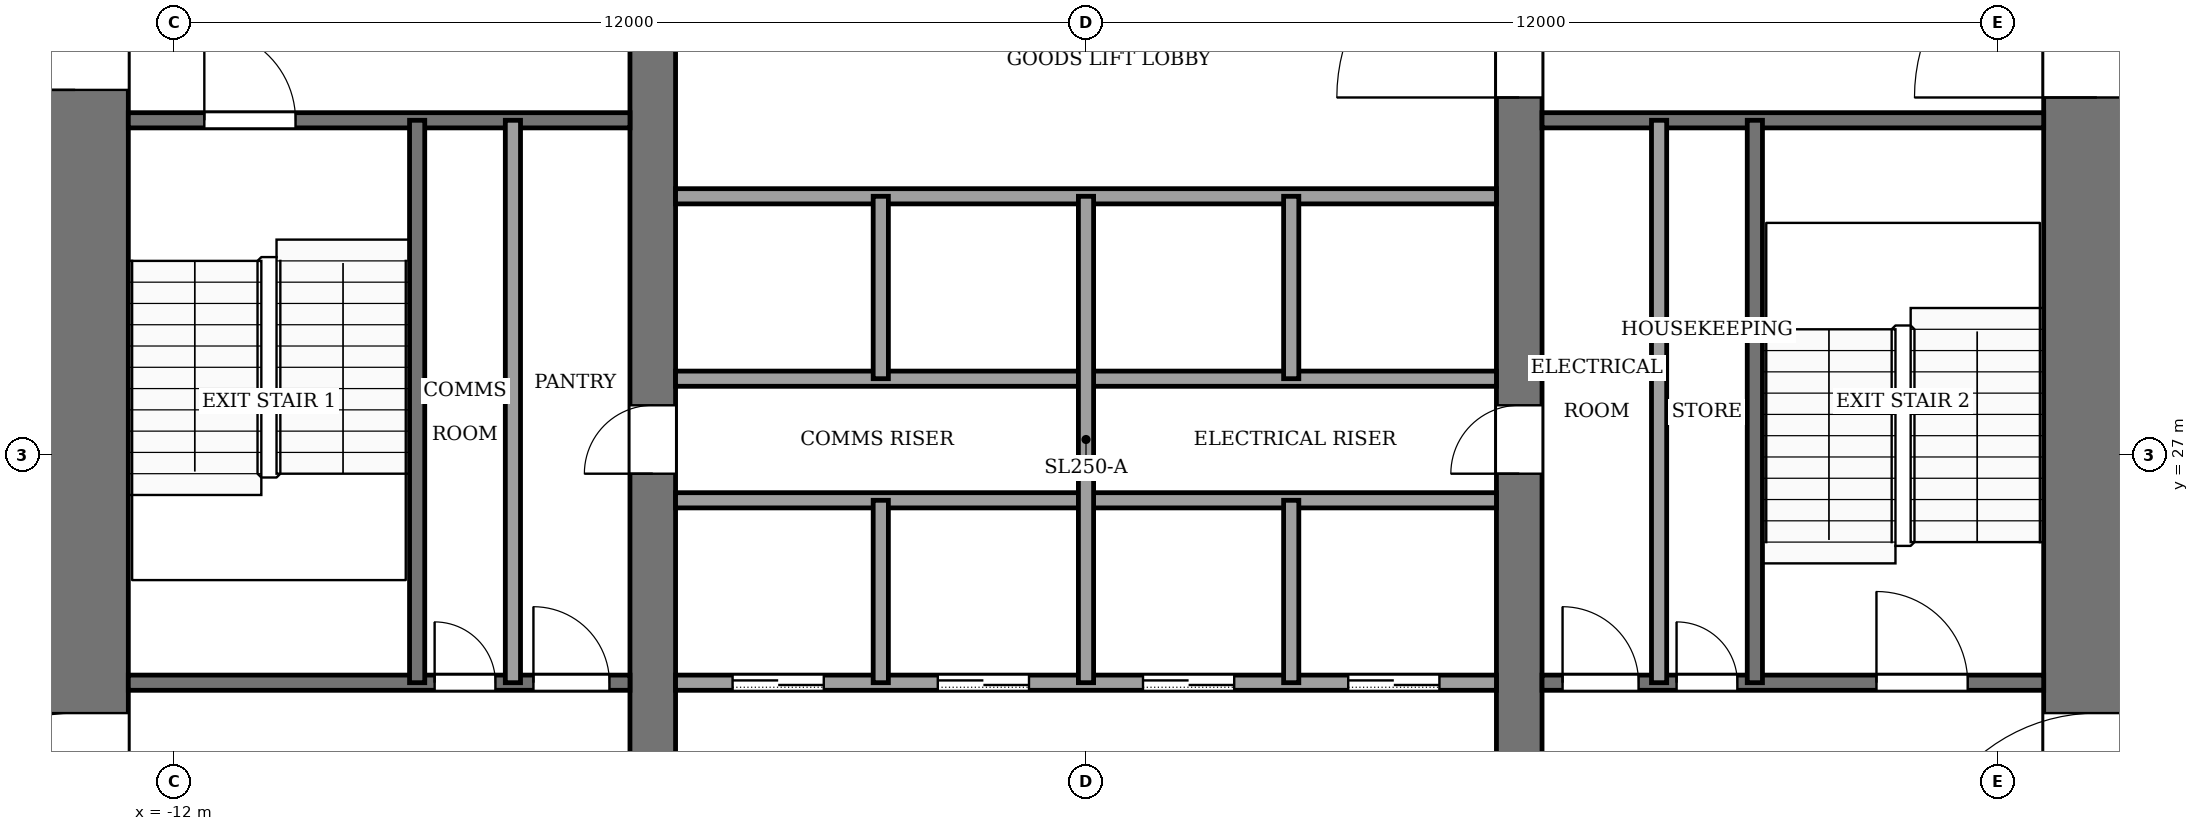
"""IFC4 building model, lengths in metres.
Left out: names, types, materials, properties, quantities, classifications, styles, units other than length and angle.
Written with IfcOpenShell. Run it as: python <this file> out.ifc"""

import sys

from ifc_helpers import new_model, si_unit, direction, frame, frame_2d, origin, place, context, subcontext, project, spatial, rectangle, extrude, element, fill, save


model = new_model("IFC4")
c1 = context("Model", 3, precision=1e-05, world=origin(), true_north=direction((0.0, 1.0)))
c2 = subcontext(c1, "Body", "Model", "MODEL_VIEW")
j1 = project(units=[si_unit("LENGTHUNIT", "METRE"), si_unit("PLANEANGLEUNIT", "RADIAN")], contexts=[c1])
p1 = place(None, origin())
s1 = spatial("IfcSite", under=j1, at=p1, CompositionType="ELEMENT")
p2 = place(p1, origin())
s2 = spatial("IfcBuilding", under=s1, at=p2, CompositionType="ELEMENT")
p3 = place(p2, frame((0.0, 0.0, 50.0)))
s3 = spatial("IfcBuildingStorey", under=s2, at=p3, CompositionType="ELEMENT", Elevation=50.0)
p4 = place(p3, frame((-13.3, 18.4, -0.13), z_axis=(0.0, 0.0, 1.0), x_axis=(0.0, 1.0, 0.0)))
e1 = element("IfcWall", 1, at=p4, inside=s3, PredefinedType="SHEAR", context=c2, shape_type="SweptSolid", body=[
    extrude(rectangle(XDim=19.2, YDim=1.4, at=frame_2d((9.6, 0.0))), origin(), (0.0, 0.0, 1.0), 4.0),
])
p5 = place(p4, frame((2.8, 0.0, 0.13)))
e2 = element("IfcOpeningElement", 2, at=p5, cuts=e1, PredefinedType="OPENING", context=c2, shape_type="SweptSolid", body=[
    extrude(rectangle(XDim=2.4, YDim=2.4, at=frame_2d((1.2, 1.2))), frame((0.0, 0.71, 0.0), z_axis=(0.0, -1.0, 0.0), x_axis=(1.0, 0.0, 0.0)), (0.0, 0.0, 1.0), 1.42),
])
p6 = place(p4, frame((13.4, 0.0, 0.13)))
e3 = element("IfcOpeningElement", 3, at=p6, cuts=e1, PredefinedType="OPENING", context=c2, shape_type="SweptSolid", body=[
    extrude(rectangle(XDim=1.4, YDim=2.2, at=frame_2d((0.7, 1.1))), frame((0.0, 0.71, 0.0), z_axis=(0.0, -1.0, 0.0), x_axis=(1.0, 0.0, 0.0)), (0.0, 0.0, 1.0), 1.42),
])
p7 = place(p3, frame((13.3, 18.4, -0.13), z_axis=(0.0, 0.0, 1.0), x_axis=(0.0, 1.0, 0.0)))
e4 = element("IfcWall", 4, at=p7, inside=s3, PredefinedType="SHEAR", context=c2, shape_type="SweptSolid", body=[
    extrude(rectangle(XDim=19.2, YDim=1.4, at=frame_2d((9.6, 0.0))), origin(), (0.0, 0.0, 1.0), 4.0),
])
p8 = place(p7, frame((2.8, 0.0, 0.13)))
e5 = element("IfcOpeningElement", 5, at=p8, cuts=e4, PredefinedType="OPENING", context=c2, shape_type="SweptSolid", body=[
    extrude(rectangle(XDim=2.4, YDim=2.4, at=frame_2d((1.2, 1.2))), frame((0.0, 0.71, 0.0), z_axis=(0.0, -1.0, 0.0), x_axis=(1.0, 0.0, 0.0)), (0.0, 0.0, 1.0), 1.42),
])
p9 = place(p7, frame((13.3, 0.0, 0.13)))
e6 = element("IfcOpeningElement", 6, at=p9, cuts=e4, PredefinedType="OPENING", context=c2, shape_type="SweptSolid", body=[
    extrude(rectangle(XDim=2.4, YDim=2.4, at=frame_2d((1.2, 1.2))), frame((0.0, 0.71, 0.0), z_axis=(0.0, -1.0, 0.0), x_axis=(1.0, 0.0, 0.0)), (0.0, 0.0, 1.0), 1.42),
])
p10 = place(p3, frame((-5.7, 18.4, -0.13), z_axis=(0.0, 0.0, 1.0), x_axis=(0.0, 1.0, 0.0)))
e7 = element("IfcWall", 7, at=p10, inside=s3, PredefinedType="SHEAR", context=c2, shape_type="SweptSolid", body=[
    extrude(rectangle(XDim=19.2, YDim=0.6, at=frame_2d((9.6, 0.0))), origin(), (0.0, 0.0, 1.0), 4.0),
])
p11 = place(p10, frame((8.35, 0.0, 0.13)))
e8 = element("IfcOpeningElement", 8, at=p11, cuts=e7, PredefinedType="OPENING", context=c2, shape_type="SweptSolid", body=[
    extrude(rectangle(XDim=0.9, YDim=2.1, at=frame_2d((0.45, 1.05))), frame((0.0, 0.31, 0.0), z_axis=(0.0, -1.0, 0.0), x_axis=(1.0, 0.0, 0.0)), (0.0, 0.0, 1.0), 0.62),
])
p12 = place(p3, frame((5.7, 18.4, -0.13), z_axis=(0.0, 0.0, 1.0), x_axis=(0.0, 1.0, 0.0)))
e9 = element("IfcWall", 9, at=p12, inside=s3, PredefinedType="SHEAR", context=c2, shape_type="SweptSolid", body=[
    extrude(rectangle(XDim=19.2, YDim=0.6, at=frame_2d((9.6, 0.0))), origin(), (0.0, 0.0, 1.0), 4.0),
])
p13 = place(p12, frame((8.35, 0.0, 0.13)))
e10 = element("IfcOpeningElement", 10, at=p13, cuts=e9, PredefinedType="OPENING", context=c2, shape_type="SweptSolid", body=[
    extrude(rectangle(XDim=0.9, YDim=2.1, at=frame_2d((0.45, 1.05))), frame((0.0, 0.31, 0.0), z_axis=(0.0, -1.0, 0.0), x_axis=(1.0, 0.0, 0.0)), (0.0, 0.0, 1.0), 0.62),
])
p14 = place(p12, frame((13.3, 0.0, 0.13)))
e11 = element("IfcOpeningElement", 11, at=p14, cuts=e9, PredefinedType="OPENING", context=c2, shape_type="SweptSolid", body=[
    extrude(rectangle(XDim=2.4, YDim=2.4, at=frame_2d((1.2, 1.2))), frame((0.0, 0.31, 0.0), z_axis=(0.0, -1.0, 0.0), x_axis=(1.0, 0.0, 0.0)), (0.0, 0.0, 1.0), 0.62),
])
p15 = place(p3, frame((-12.6, 24.0, 0.0), z_axis=(0.0, 0.0, 1.0), x_axis=(1.0, 0.0, 0.0)))
e12 = element("IfcWall", 12, at=p15, inside=s3, PredefinedType="PARTITIONING", context=c2, shape_type="SweptSolid", body=[
    extrude(rectangle(XDim=6.6, YDim=0.2, at=frame_2d((3.3, 0.0))), origin(), (0.0, 0.0, 1.0), 3.87),
])
p16 = place(p15, frame((4.03, 0.0, 0.0)))
e13 = element("IfcOpeningElement", 13, at=p16, cuts=e12, PredefinedType="OPENING", context=c2, shape_type="SweptSolid", body=[
    extrude(rectangle(XDim=0.8, YDim=2.1, at=frame_2d((0.4, 1.05))), frame((0.0, 0.11, 0.0), z_axis=(0.0, -1.0, 0.0), x_axis=(1.0, 0.0, 0.0)), (0.0, 0.0, 1.0), 0.22),
])
p17 = place(p15, frame((5.33, 0.0, 0.0)))
e14 = element("IfcOpeningElement", 14, at=p17, cuts=e12, PredefinedType="OPENING", context=c2, shape_type="SweptSolid", body=[
    extrude(rectangle(XDim=1.0, YDim=2.1, at=frame_2d((0.5, 1.05))), frame((0.0, 0.11, 0.0), z_axis=(0.0, -1.0, 0.0), x_axis=(1.0, 0.0, 0.0)), (0.0, 0.0, 1.0), 0.22),
])
p18 = place(p3, frame((-5.4, 24.0, 0.0), z_axis=(0.0, 0.0, 1.0), x_axis=(1.0, 0.0, 0.0)))
e15 = element("IfcWall", 15, at=p18, inside=s3, PredefinedType="PARTITIONING", context=c2, shape_type="SweptSolid", body=[
    extrude(rectangle(XDim=10.8, YDim=0.2, at=frame_2d((5.4, 0.0))), origin(), (0.0, 0.0, 1.0), 3.87),
])
p19 = place(p18, frame((0.75, 0.0, 0.0)))
e16 = element("IfcOpeningElement", 16, at=p19, cuts=e15, PredefinedType="OPENING", context=c2, shape_type="SweptSolid", body=[
    extrude(rectangle(XDim=1.2, YDim=2.2, at=frame_2d((0.6, 1.1))), frame((0.0, 0.11, 0.0), z_axis=(0.0, -1.0, 0.0), x_axis=(1.0, 0.0, 0.0)), (0.0, 0.0, 1.0), 0.22),
])
p20 = place(p18, frame((3.45, 0.0, 0.0)))
e17 = element("IfcOpeningElement", 17, at=p20, cuts=e15, PredefinedType="OPENING", context=c2, shape_type="SweptSolid", body=[
    extrude(rectangle(XDim=1.2, YDim=2.2, at=frame_2d((0.6, 1.1))), frame((0.0, 0.11, 0.0), z_axis=(0.0, -1.0, 0.0), x_axis=(1.0, 0.0, 0.0)), (0.0, 0.0, 1.0), 0.22),
])
p21 = place(p18, frame((6.15, 0.0, 0.0)))
e18 = element("IfcOpeningElement", 18, at=p21, cuts=e15, PredefinedType="OPENING", context=c2, shape_type="SweptSolid", body=[
    extrude(rectangle(XDim=1.2, YDim=2.2, at=frame_2d((0.6, 1.1))), frame((0.0, 0.11, 0.0), z_axis=(0.0, -1.0, 0.0), x_axis=(1.0, 0.0, 0.0)), (0.0, 0.0, 1.0), 0.22),
])
p22 = place(p18, frame((8.85, 0.0, 0.0)))
e19 = element("IfcOpeningElement", 19, at=p22, cuts=e15, PredefinedType="OPENING", context=c2, shape_type="SweptSolid", body=[
    extrude(rectangle(XDim=1.2, YDim=2.2, at=frame_2d((0.6, 1.1))), frame((0.0, 0.11, 0.0), z_axis=(0.0, -1.0, 0.0), x_axis=(1.0, 0.0, 0.0)), (0.0, 0.0, 1.0), 0.22),
])
p23 = place(p3, frame((6.0, 24.0, 0.0), z_axis=(0.0, 0.0, 1.0), x_axis=(1.0, 0.0, 0.0)))
e20 = element("IfcWall", 20, at=p23, inside=s3, PredefinedType="PARTITIONING", context=c2, shape_type="SweptSolid", body=[
    extrude(rectangle(XDim=6.6, YDim=0.2, at=frame_2d((3.3, 0.0))), origin(), (0.0, 0.0, 1.0), 3.87),
])
p24 = place(p23, frame((0.27, 0.0, 0.0)))
e21 = element("IfcOpeningElement", 21, at=p24, cuts=e20, PredefinedType="OPENING", context=c2, shape_type="SweptSolid", body=[
    extrude(rectangle(XDim=1.0, YDim=2.1, at=frame_2d((0.5, 1.05))), frame((0.0, 0.11, 0.0), z_axis=(0.0, -1.0, 0.0), x_axis=(1.0, 0.0, 0.0)), (0.0, 0.0, 1.0), 0.22),
])
p25 = place(p23, frame((1.77, 0.0, 0.0)))
e22 = element("IfcOpeningElement", 22, at=p25, cuts=e20, PredefinedType="OPENING", context=c2, shape_type="SweptSolid", body=[
    extrude(rectangle(XDim=0.8, YDim=2.1, at=frame_2d((0.4, 1.05))), frame((0.0, 0.11, 0.0), z_axis=(0.0, -1.0, 0.0), x_axis=(1.0, 0.0, 0.0)), (0.0, 0.0, 1.0), 0.22),
])
p26 = place(p23, frame((4.4, 0.0, 0.0)))
e23 = element("IfcOpeningElement", 23, at=p26, cuts=e20, PredefinedType="OPENING", context=c2, shape_type="SweptSolid", body=[
    extrude(rectangle(XDim=1.2, YDim=2.2, at=frame_2d((0.6, 1.1))), frame((0.0, 0.11, 0.0), z_axis=(0.0, -1.0, 0.0), x_axis=(1.0, 0.0, 0.0)), (0.0, 0.0, 1.0), 0.22),
])
for number, where, z_axis, x_axis in (
    (24, (-5.4, 26.4, 0.0), (0.0, 0.0, 1.0), (1.0, 0.0, 0.0)),
    (25, (-5.4, 28.0, 0.0), (0.0, 0.0, 1.0), (1.0, 0.0, 0.0)),
    (26, (-5.4, 30.4, 0.0), (0.0, 0.0, 1.0), (1.0, 0.0, 0.0)),
):
    element("IfcWall", number, at=place(p3, frame(where, z_axis=z_axis, x_axis=x_axis)), inside=s3, PredefinedType="PARTITIONING", context=c2, shape_type="SweptSolid", body=[
        extrude(rectangle(XDim=10.8, YDim=0.2, at=frame_2d((5.4, 0.0))), origin(), (0.0, 0.0, 1.0), 3.87),
    ])
p27 = place(p3, frame((-12.6, 31.4, 0.0), z_axis=(0.0, 0.0, 1.0), x_axis=(1.0, 0.0, 0.0)))
e27 = element("IfcWall", 27, at=p27, inside=s3, PredefinedType="PARTITIONING", context=c2, shape_type="SweptSolid", body=[
    extrude(rectangle(XDim=6.6, YDim=0.2, at=frame_2d((3.3, 0.0))), origin(), (0.0, 0.0, 1.0), 3.87),
])
p28 = place(p27, frame((1.0, 0.0, 0.0)))
e28 = element("IfcOpeningElement", 28, at=p28, cuts=e27, PredefinedType="OPENING", context=c2, shape_type="SweptSolid", body=[
    extrude(rectangle(XDim=1.2, YDim=2.2, at=frame_2d((0.6, 1.1))), frame((0.0, 0.11, 0.0), z_axis=(0.0, -1.0, 0.0), x_axis=(1.0, 0.0, 0.0)), (0.0, 0.0, 1.0), 0.22),
])
p29 = place(p3, frame((6.0, 31.4, 0.0), z_axis=(0.0, 0.0, 1.0), x_axis=(1.0, 0.0, 0.0)))
e29 = element("IfcWall", 29, at=p29, inside=s3, PredefinedType="PARTITIONING", context=c2, shape_type="SweptSolid", body=[
    extrude(rectangle(XDim=6.6, YDim=0.2, at=frame_2d((3.3, 0.0))), origin(), (0.0, 0.0, 1.0), 3.87),
])
for number, where, z_axis, x_axis in (
    (30, (-8.8, 24.0, 0.0), (0.0, 0.0, 1.0), (0.0, 1.0, 0.0)),
    (31, (-7.54, 24.0, 0.0), (0.0, 0.0, 1.0), (0.0, 1.0, 0.0)),
):
    element("IfcWall", number, at=place(p3, frame(where, z_axis=z_axis, x_axis=x_axis)), inside=s3, PredefinedType="PARTITIONING", context=c2, shape_type="SweptSolid", body=[
        extrude(rectangle(XDim=7.4, YDim=0.2, at=frame_2d((3.7, 0.0))), origin(), (0.0, 0.0, 1.0), 3.87),
    ])
for number, where, z_axis, x_axis in (
    (32, (-2.7, 24.0, 0.0), (0.0, 0.0, 1.0), (0.0, 1.0, 0.0)),
    (33, (-2.7, 28.0, 0.0), (0.0, 0.0, 1.0), (0.0, 1.0, 0.0)),
):
    element("IfcWall", number, at=place(p3, frame(where, z_axis=z_axis, x_axis=x_axis)), inside=s3, PredefinedType="PARTITIONING", context=c2, shape_type="SweptSolid", body=[
        extrude(rectangle(XDim=2.4, YDim=0.2, at=frame_2d((1.2, 0.0))), origin(), (0.0, 0.0, 1.0), 3.87),
    ])
p30 = place(p3, frame((0.0, 24.0, 0.0), z_axis=(0.0, 0.0, 1.0), x_axis=(0.0, 1.0, 0.0)))
e34 = element("IfcWall", 34, at=p30, inside=s3, PredefinedType="PARTITIONING", context=c2, shape_type="SweptSolid", body=[
    extrude(rectangle(XDim=6.4, YDim=0.2, at=frame_2d((3.2, 0.0))), origin(), (0.0, 0.0, 1.0), 3.87),
])
for number, where, z_axis, x_axis in (
    (35, (2.7, 24.0, 0.0), (0.0, 0.0, 1.0), (0.0, 1.0, 0.0)),
    (36, (2.7, 28.0, 0.0), (0.0, 0.0, 1.0), (0.0, 1.0, 0.0)),
):
    element("IfcWall", number, at=place(p3, frame(where, z_axis=z_axis, x_axis=x_axis)), inside=s3, PredefinedType="PARTITIONING", context=c2, shape_type="SweptSolid", body=[
        extrude(rectangle(XDim=2.4, YDim=0.2, at=frame_2d((1.2, 0.0))), origin(), (0.0, 0.0, 1.0), 3.87),
    ])
for number, where, z_axis, x_axis in (
    (37, (7.54, 24.0, 0.0), (0.0, 0.0, 1.0), (0.0, 1.0, 0.0)),
    (38, (8.8, 24.0, 0.0), (0.0, 0.0, 1.0), (0.0, 1.0, 0.0)),
):
    element("IfcWall", number, at=place(p3, frame(where, z_axis=z_axis, x_axis=x_axis)), inside=s3, PredefinedType="PARTITIONING", context=c2, shape_type="SweptSolid", body=[
        extrude(rectangle(XDim=7.4, YDim=0.2, at=frame_2d((3.7, 0.0))), origin(), (0.0, 0.0, 1.0), 3.87),
    ])
p31 = place(p19, origin())
e39 = element("IfcDoor", 39, at=p31, inside=s3, OperationType="SLIDING_TO_LEFT", PredefinedType="DOOR", context=c2, shape_type="SweptSolid", body=[
    extrude(rectangle(XDim=1.2, YDim=2.2, at=frame_2d((0.6, 1.1))), frame((0.0, 0.025, 0.0), z_axis=(0.0, -1.0, 0.0), x_axis=(1.0, 0.0, 0.0)), (0.0, 0.0, 1.0), 0.05),
])
fill(e16, e39)
p32 = place(p20, origin())
e40 = element("IfcDoor", 40, at=p32, inside=s3, OperationType="SLIDING_TO_LEFT", PredefinedType="DOOR", context=c2, shape_type="SweptSolid", body=[
    extrude(rectangle(XDim=1.2, YDim=2.2, at=frame_2d((0.6, 1.1))), frame((0.0, 0.025, 0.0), z_axis=(0.0, -1.0, 0.0), x_axis=(1.0, 0.0, 0.0)), (0.0, 0.0, 1.0), 0.05),
])
fill(e17, e40)
p33 = place(p21, origin())
e41 = element("IfcDoor", 41, at=p33, inside=s3, OperationType="SLIDING_TO_LEFT", PredefinedType="DOOR", context=c2, shape_type="SweptSolid", body=[
    extrude(rectangle(XDim=1.2, YDim=2.2, at=frame_2d((0.6, 1.1))), frame((0.0, 0.025, 0.0), z_axis=(0.0, -1.0, 0.0), x_axis=(1.0, 0.0, 0.0)), (0.0, 0.0, 1.0), 0.05),
])
fill(e18, e41)
p34 = place(p22, origin())
e42 = element("IfcDoor", 42, at=p34, inside=s3, OperationType="SLIDING_TO_LEFT", PredefinedType="DOOR", context=c2, shape_type="SweptSolid", body=[
    extrude(rectangle(XDim=1.2, YDim=2.2, at=frame_2d((0.6, 1.1))), frame((0.0, 0.025, 0.0), z_axis=(0.0, -1.0, 0.0), x_axis=(1.0, 0.0, 0.0)), (0.0, 0.0, 1.0), 0.05),
])
fill(e19, e42)
p35 = place(p16, origin())
e43 = element("IfcDoor", 43, at=p35, inside=s3, OperationType="SINGLE_SWING_RIGHT", PredefinedType="DOOR", context=c2, shape_type="SweptSolid", body=[
    extrude(rectangle(XDim=0.8, YDim=2.1, at=frame_2d((0.4, 1.05))), frame((0.0, 0.025, 0.0), z_axis=(0.0, -1.0, 0.0), x_axis=(1.0, 0.0, 0.0)), (0.0, 0.0, 1.0), 0.05),
])
fill(e13, e43)
p36 = place(p17, origin())
e44 = element("IfcDoor", 44, at=p36, inside=s3, OperationType="SINGLE_SWING_LEFT", PredefinedType="DOOR", context=c2, shape_type="SweptSolid", body=[
    extrude(rectangle(XDim=1.0, YDim=2.1, at=frame_2d((0.5, 1.05))), frame((0.0, 0.025, 0.0), z_axis=(0.0, -1.0, 0.0), x_axis=(1.0, 0.0, 0.0)), (0.0, 0.0, 1.0), 0.05),
])
fill(e14, e44)
p37 = place(p24, origin())
e45 = element("IfcDoor", 45, at=p37, inside=s3, OperationType="SINGLE_SWING_RIGHT", PredefinedType="DOOR", context=c2, shape_type="SweptSolid", body=[
    extrude(rectangle(XDim=1.0, YDim=2.1, at=frame_2d((0.5, 1.05))), frame((0.0, 0.025, 0.0), z_axis=(0.0, -1.0, 0.0), x_axis=(1.0, 0.0, 0.0)), (0.0, 0.0, 1.0), 0.05),
])
fill(e21, e45)
p38 = place(p25, origin())
e46 = element("IfcDoor", 46, at=p38, inside=s3, OperationType="SINGLE_SWING_LEFT", PredefinedType="DOOR", context=c2, shape_type="SweptSolid", body=[
    extrude(rectangle(XDim=0.8, YDim=2.1, at=frame_2d((0.4, 1.05))), frame((0.0, 0.025, 0.0), z_axis=(0.0, -1.0, 0.0), x_axis=(1.0, 0.0, 0.0)), (0.0, 0.0, 1.0), 0.05),
])
fill(e22, e46)
p39 = place(p11, origin())
e47 = element("IfcDoor", 47, at=p39, inside=s3, OperationType="SINGLE_SWING_RIGHT", PredefinedType="DOOR", context=c2, shape_type="SweptSolid", body=[
    extrude(rectangle(XDim=0.9, YDim=2.1, at=frame_2d((0.45, 1.05))), frame((0.0, 0.025, 0.0), z_axis=(0.0, -1.0, 0.0), x_axis=(1.0, 0.0, 0.0)), (0.0, 0.0, 1.0), 0.05),
])
fill(e8, e47)
p40 = place(p13, origin())
e48 = element("IfcDoor", 48, at=p40, inside=s3, OperationType="SINGLE_SWING_LEFT", PredefinedType="DOOR", context=c2, shape_type="SweptSolid", body=[
    extrude(rectangle(XDim=0.9, YDim=2.1, at=frame_2d((0.45, 1.05))), frame((0.0, 0.025, 0.0), z_axis=(0.0, -1.0, 0.0), x_axis=(1.0, 0.0, 0.0)), (0.0, 0.0, 1.0), 0.05),
])
fill(e10, e48)
p41 = place(p28, origin())
e49 = element("IfcDoor", 49, at=p41, inside=s3, OperationType="SINGLE_SWING_LEFT", PredefinedType="DOOR", context=c2, shape_type="SweptSolid", body=[
    extrude(rectangle(XDim=1.2, YDim=2.2, at=frame_2d((0.6, 1.1))), frame((0.0, 0.025, 0.0), z_axis=(0.0, -1.0, 0.0), x_axis=(1.0, 0.0, 0.0)), (0.0, 0.0, 1.0), 0.05),
])
fill(e28, e49)
p42 = place(p26, origin())
e50 = element("IfcDoor", 50, at=p42, inside=s3, OperationType="SINGLE_SWING_RIGHT", PredefinedType="DOOR", context=c2, shape_type="SweptSolid", body=[
    extrude(rectangle(XDim=1.2, YDim=2.2, at=frame_2d((0.6, 1.1))), frame((0.0, 0.025, 0.0), z_axis=(0.0, -1.0, 0.0), x_axis=(1.0, 0.0, 0.0)), (0.0, 0.0, 1.0), 0.05),
])
fill(e23, e50)
p43 = place(p14, origin())
e51 = element("IfcDoor", 51, at=p43, inside=s3, OperationType="DOUBLE_DOOR_SINGLE_SWING", PredefinedType="DOOR", context=c2, shape_type="SweptSolid", body=[
    extrude(rectangle(XDim=2.4, YDim=2.4, at=frame_2d((1.2, 1.2))), frame((0.0, 0.025, 0.0), z_axis=(0.0, -1.0, 0.0), x_axis=(1.0, 0.0, 0.0)), (0.0, 0.0, 1.0), 0.05),
])
fill(e11, e51)
p44 = place(p5, origin())
e52 = element("IfcDoor", 52, at=p44, inside=s3, OperationType="DOUBLE_DOOR_SINGLE_SWING", PredefinedType="DOOR", context=c2, shape_type="SweptSolid", body=[
    extrude(rectangle(XDim=2.4, YDim=2.4, at=frame_2d((1.2, 1.2))), frame((0.0, 0.025, 0.0), z_axis=(0.0, -1.0, 0.0), x_axis=(1.0, 0.0, 0.0)), (0.0, 0.0, 1.0), 0.05),
])
fill(e2, e52)
p45 = place(p8, origin())
e53 = element("IfcDoor", 53, at=p45, inside=s3, OperationType="DOUBLE_DOOR_SINGLE_SWING", PredefinedType="DOOR", context=c2, shape_type="SweptSolid", body=[
    extrude(rectangle(XDim=2.4, YDim=2.4, at=frame_2d((1.2, 1.2))), frame((0.0, 0.025, 0.0), z_axis=(0.0, -1.0, 0.0), x_axis=(1.0, 0.0, 0.0)), (0.0, 0.0, 1.0), 0.05),
])
fill(e5, e53)
p46 = place(p9, origin())
e54 = element("IfcDoor", 54, at=p46, inside=s3, OperationType="DOUBLE_DOOR_SINGLE_SWING", PredefinedType="DOOR", context=c2, shape_type="SweptSolid", body=[
    extrude(rectangle(XDim=2.4, YDim=2.4, at=frame_2d((1.2, 1.2))), frame((0.0, 0.025, 0.0), z_axis=(0.0, -1.0, 0.0), x_axis=(1.0, 0.0, 0.0)), (0.0, 0.0, 1.0), 0.05),
])
fill(e6, e54)
p47 = place(p6, origin())
e55 = element("IfcDoor", 55, at=p47, inside=s3, OperationType="SINGLE_SWING_LEFT", PredefinedType="DOOR", context=c2, shape_type="SweptSolid", body=[
    extrude(rectangle(XDim=1.4, YDim=2.2, at=frame_2d((0.7, 1.1))), frame((0.0, 0.025, 0.0), z_axis=(0.0, -1.0, 0.0), x_axis=(1.0, 0.0, 0.0)), (0.0, 0.0, 1.0), 0.05),
])
fill(e3, e55)
save(model, sys.argv[1])
